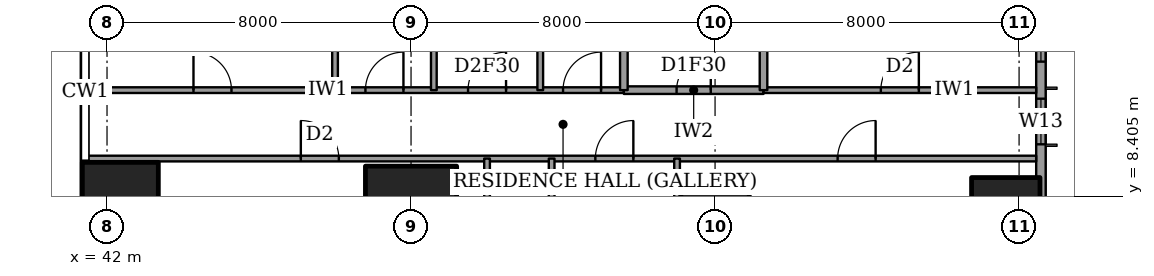
"""IFC4 building model, lengths in metres.
Left out: names, types, materials, properties, quantities, classifications, styles, units other than length and angle.
Written with IfcOpenShell. Run it as: python <this file> out.ifc"""

import sys

from ifc_helpers import new_model, si_unit, direction, frame, frame_2d, origin, origin_2d, place, context, subcontext, project, spatial, rectangle, extrude, element, fill, save


model = new_model("IFC4")
c1 = context("Model", 3, precision=1e-05, world=origin(), true_north=direction((0.0, 1.0)))
c2 = subcontext(c1, "Body", "Model", "MODEL_VIEW")
j1 = project(units=[si_unit("LENGTHUNIT", "METRE"), si_unit("PLANEANGLEUNIT", "RADIAN")], contexts=[c1])
p1 = place(None, origin())
s1 = spatial("IfcSite", under=j1, at=p1, CompositionType="ELEMENT")
p2 = place(p1, origin())
s2 = spatial("IfcBuilding", under=s1, at=p2, CompositionType="ELEMENT")
p3 = place(p2, frame((0.0, 0.0, 185.8)))
s3 = spatial("IfcBuildingStorey", under=s2, at=p3, CompositionType="ELEMENT", Elevation=185.8)
p4 = place(p3, frame((42.35, 8.0, 0.0), z_axis=(0.0, 0.0, 1.0), x_axis=(1.0, 0.0, 0.0)))
e1 = element("IfcColumn", 1, at=p4, inside=s3, PredefinedType="COLUMN", context=c2, shape_type="SweptSolid", body=[
    extrude(rectangle(XDim=2.0, YDim=2.6, at=origin_2d()), origin(), (0.0, 0.0, 1.0), 3.6),
])
p5 = place(p3, frame((50.0, 8.0, 0.0), z_axis=(0.0, 0.0, 1.0), x_axis=(1.0, 0.0, 0.0)))
e2 = element("IfcColumn", 2, at=p5, inside=s3, PredefinedType="COLUMN", context=c2, shape_type="SweptSolid", body=[
    extrude(rectangle(XDim=2.4, YDim=2.4, at=origin_2d()), origin(), (0.0, 0.0, 1.0), 3.6),
])
for number, where, z_axis, x_axis in (
    (3, (58.0, 8.0, 0.0), (0.0, 0.0, 1.0), (1.0, 0.0, 0.0)),
    (4, (65.65, 8.0, 0.0), (0.0, 0.0, 1.0), (1.0, 0.0, 0.0)),
):
    element("IfcColumn", number, at=place(p3, frame(where, z_axis=z_axis, x_axis=x_axis)), inside=s3, PredefinedType="COLUMN", context=c2, shape_type="SweptSolid", body=[
        extrude(rectangle(XDim=1.8, YDim=1.8, at=origin_2d()), origin(), (0.0, 0.0, 1.0), 3.6),
    ])
p6 = place(p3, frame((66.575, 3.175, 0.0), z_axis=(0.0, 0.0, 1.0), x_axis=(0.0, 1.0, 0.0)))
e5 = element("IfcWall", 5, at=p6, inside=s3, PredefinedType="SOLIDWALL", context=c2, shape_type="SweptSolid", body=[
    extrude(rectangle(XDim=41.65, YDim=0.25, at=frame_2d((20.825, 0.0))), origin(), (0.0, 0.0, 1.0), 3.6),
])
p7 = place(p6, frame((0.825, 0.0, 0.2)))
e6 = element("IfcOpeningElement", 6, at=p7, cuts=e5, PredefinedType="OPENING", context=c2, shape_type="SweptSolid", body=[
    extrude(rectangle(XDim=2.4, YDim=2.4, at=frame_2d((1.2, 1.2))), frame((0.0, 0.135, 0.0), z_axis=(0.0, -1.0, 0.0), x_axis=(1.0, 0.0, 0.0)), (0.0, 0.0, 1.0), 0.27),
])
p8 = place(p6, frame((6.6, 0.0, 0.2)))
e7 = element("IfcOpeningElement", 7, at=p8, cuts=e5, PredefinedType="OPENING", context=c2, shape_type="SweptSolid", body=[
    extrude(rectangle(XDim=1.2, YDim=2.4, at=frame_2d((0.6, 1.2))), frame((0.0, 0.135, 0.0), z_axis=(0.0, -1.0, 0.0), x_axis=(1.0, 0.0, 0.0)), (0.0, 0.0, 1.0), 0.27),
])
p9 = place(p6, frame((8.775, 0.0, 0.2)))
e8 = element("IfcOpeningElement", 8, at=p9, cuts=e5, PredefinedType="OPENING", context=c2, shape_type="SweptSolid", body=[
    extrude(rectangle(XDim=2.4, YDim=2.4, at=frame_2d((1.2, 1.2))), frame((0.0, 0.135, 0.0), z_axis=(0.0, -1.0, 0.0), x_axis=(1.0, 0.0, 0.0)), (0.0, 0.0, 1.0), 0.27),
])
p10 = place(p6, frame((15.675, 0.0, 0.2)))
e9 = element("IfcOpeningElement", 9, at=p10, cuts=e5, PredefinedType="OPENING", context=c2, shape_type="SweptSolid", body=[
    extrude(rectangle(XDim=2.4, YDim=2.4, at=frame_2d((1.2, 1.2))), frame((0.0, 0.135, 0.0), z_axis=(0.0, -1.0, 0.0), x_axis=(1.0, 0.0, 0.0)), (0.0, 0.0, 1.0), 0.27),
])
p11 = place(p6, frame((23.575, 0.0, 0.2)))
e10 = element("IfcOpeningElement", 10, at=p11, cuts=e5, PredefinedType="OPENING", context=c2, shape_type="SweptSolid", body=[
    extrude(rectangle(XDim=2.4, YDim=2.4, at=frame_2d((1.2, 1.2))), frame((0.0, 0.135, 0.0), z_axis=(0.0, -1.0, 0.0), x_axis=(1.0, 0.0, 0.0)), (0.0, 0.0, 1.0), 0.27),
])
p12 = place(p6, frame((30.775, 0.0, 0.2)))
e11 = element("IfcOpeningElement", 11, at=p12, cuts=e5, PredefinedType="OPENING", context=c2, shape_type="SweptSolid", body=[
    extrude(rectangle(XDim=2.4, YDim=2.4, at=frame_2d((1.2, 1.2))), frame((0.0, 0.135, 0.0), z_axis=(0.0, -1.0, 0.0), x_axis=(1.0, 0.0, 0.0)), (0.0, 0.0, 1.0), 0.27),
])
p13 = place(p6, frame((34.55, 0.0, 0.2)))
e12 = element("IfcOpeningElement", 12, at=p13, cuts=e5, PredefinedType="OPENING", context=c2, shape_type="SweptSolid", body=[
    extrude(rectangle(XDim=1.2, YDim=2.4, at=frame_2d((0.6, 1.2))), frame((0.0, 0.135, 0.0), z_axis=(0.0, -1.0, 0.0), x_axis=(1.0, 0.0, 0.0)), (0.0, 0.0, 1.0), 0.27),
])
p14 = place(p6, frame((38.425, 0.0, 0.2)))
e13 = element("IfcOpeningElement", 13, at=p14, cuts=e5, PredefinedType="OPENING", context=c2, shape_type="SweptSolid", body=[
    extrude(rectangle(XDim=2.4, YDim=2.4, at=frame_2d((1.2, 1.2))), frame((0.0, 0.135, 0.0), z_axis=(0.0, -1.0, 0.0), x_axis=(1.0, 0.0, 0.0)), (0.0, 0.0, 1.0), 0.27),
])
p15 = place(p3, frame((41.439, 9.4, 0.0), z_axis=(0.0, 0.0, 1.0), x_axis=(1.0, 0.0, 0.0)))
e14 = element("IfcWall", 14, at=p15, inside=s3, PredefinedType="PARTITIONING", context=c2, shape_type="SweptSolid", body=[
    extrude(rectangle(XDim=25.011, YDim=0.15, at=frame_2d((12.505, 0.0))), origin(), (0.0, 0.0, 1.0), 3.35),
])
p16 = place(p15, frame((19.786, 0.0, 0.0)))
e15 = element("IfcOpeningElement", 15, at=p16, cuts=e14, PredefinedType="OPENING", context=c2, shape_type="SweptSolid", body=[
    extrude(rectangle(XDim=1.0, YDim=2.1, at=frame_2d((0.5, 1.05))), frame((0.0, 0.085, 0.0), z_axis=(0.0, -1.0, 0.0), x_axis=(1.0, 0.0, 0.0)), (0.0, 0.0, 1.0), 0.17),
])
p17 = place(p15, frame((13.411, 0.0, 0.0)))
e16 = element("IfcOpeningElement", 16, at=p17, cuts=e14, PredefinedType="OPENING", context=c2, shape_type="SweptSolid", body=[
    extrude(rectangle(XDim=1.0, YDim=2.1, at=frame_2d((0.5, 1.05))), frame((0.0, 0.085, 0.0), z_axis=(0.0, -1.0, 0.0), x_axis=(1.0, 0.0, 0.0)), (0.0, 0.0, 1.0), 0.17),
])
p18 = place(p15, frame((5.661, 0.0, 0.0)))
e17 = element("IfcOpeningElement", 17, at=p18, cuts=e14, PredefinedType="OPENING", context=c2, shape_type="SweptSolid", body=[
    extrude(rectangle(XDim=1.0, YDim=2.1, at=frame_2d((0.5, 1.05))), frame((0.0, 0.085, 0.0), z_axis=(0.0, -1.0, 0.0), x_axis=(1.0, 0.0, 0.0)), (0.0, 0.0, 1.0), 0.17),
])
p19 = place(p3, frame((55.6, 11.2, 0.0), z_axis=(0.0, 0.0, 1.0), x_axis=(1.0, 0.0, 0.0)))
e18 = element("IfcWall", 18, at=p19, inside=s3, PredefinedType="PARTITIONING", context=c2, shape_type="SweptSolid", body=[
    extrude(rectangle(XDim=3.675, YDim=0.2, at=frame_2d((1.837, 0.0))), origin(), (0.0, 0.0, 1.0), 3.35),
])
p20 = place(p19, frame((1.387, 0.0, 0.0)))
e19 = element("IfcOpeningElement", 19, at=p20, cuts=e18, PredefinedType="OPENING", context=c2, shape_type="SweptSolid", body=[
    extrude(rectangle(XDim=0.9, YDim=2.1, at=frame_2d((0.45, 1.05))), frame((0.0, 0.11, 0.0), z_axis=(0.0, -1.0, 0.0), x_axis=(1.0, 0.0, 0.0)), (0.0, 0.0, 1.0), 0.22),
])
p21 = place(p3, frame((41.439, 11.2, 0.0), z_axis=(0.0, 0.0, 1.0), x_axis=(1.0, 0.0, 0.0)))
e20 = element("IfcWall", 20, at=p21, inside=s3, PredefinedType="PARTITIONING", context=c2, shape_type="SweptSolid", body=[
    extrude(rectangle(XDim=14.161, YDim=0.15, at=frame_2d((7.081, 0.0))), origin(), (0.0, 0.0, 1.0), 3.35),
])
p22 = place(p21, frame((12.561, 0.0, 0.0)))
e21 = element("IfcOpeningElement", 21, at=p22, cuts=e20, PredefinedType="OPENING", context=c2, shape_type="SweptSolid", body=[
    extrude(rectangle(XDim=1.0, YDim=2.1, at=frame_2d((0.5, 1.05))), frame((0.0, 0.085, 0.0), z_axis=(0.0, -1.0, 0.0), x_axis=(1.0, 0.0, 0.0)), (0.0, 0.0, 1.0), 0.17),
])
p23 = place(p21, frame((10.061, 0.0, 0.0)))
e22 = element("IfcOpeningElement", 22, at=p23, cuts=e20, PredefinedType="OPENING", context=c2, shape_type="SweptSolid", body=[
    extrude(rectangle(XDim=1.0, YDim=2.1, at=frame_2d((0.5, 1.05))), frame((0.0, 0.085, 0.0), z_axis=(0.0, -1.0, 0.0), x_axis=(1.0, 0.0, 0.0)), (0.0, 0.0, 1.0), 0.17),
])
p24 = place(p21, frame((7.361, 0.0, 0.0)))
e23 = element("IfcOpeningElement", 23, at=p24, cuts=e20, PredefinedType="OPENING", context=c2, shape_type="SweptSolid", body=[
    extrude(rectangle(XDim=1.0, YDim=2.1, at=frame_2d((0.5, 1.05))), frame((0.0, 0.085, 0.0), z_axis=(0.0, -1.0, 0.0), x_axis=(1.0, 0.0, 0.0)), (0.0, 0.0, 1.0), 0.17),
])
p25 = place(p21, frame((2.836, 0.0, 0.0)))
e24 = element("IfcOpeningElement", 24, at=p25, cuts=e20, PredefinedType="OPENING", context=c2, shape_type="SweptSolid", body=[
    extrude(rectangle(XDim=1.0, YDim=2.1, at=frame_2d((0.5, 1.05))), frame((0.0, 0.085, 0.0), z_axis=(0.0, -1.0, 0.0), x_axis=(1.0, 0.0, 0.0)), (0.0, 0.0, 1.0), 0.17),
])
p26 = place(p3, frame((59.275, 11.2, 0.0), z_axis=(0.0, 0.0, 1.0), x_axis=(1.0, 0.0, 0.0)))
e25 = element("IfcWall", 25, at=p26, inside=s3, PredefinedType="PARTITIONING", context=c2, shape_type="SweptSolid", body=[
    extrude(rectangle(XDim=7.175, YDim=0.15, at=frame_2d((3.587, 0.0))), origin(), (0.0, 0.0, 1.0), 3.35),
])
p27 = place(p26, frame((3.087, 0.0, 0.0)))
e26 = element("IfcOpeningElement", 26, at=p27, cuts=e25, PredefinedType="OPENING", context=c2, shape_type="SweptSolid", body=[
    extrude(rectangle(XDim=1.0, YDim=2.1, at=frame_2d((0.5, 1.05))), frame((0.0, 0.085, 0.0), z_axis=(0.0, -1.0, 0.0), x_axis=(1.0, 0.0, 0.0)), (0.0, 0.0, 1.0), 0.17),
])
p28 = place(p3, frame((48.0, 11.2, 0.0), z_axis=(0.0, 0.0, 1.0), x_axis=(0.0, 1.0, 0.0)))
e27 = element("IfcWall", 27, at=p28, inside=s3, PredefinedType="PARTITIONING", context=c2, shape_type="SweptSolid", body=[
    extrude(rectangle(XDim=6.8, YDim=0.15, at=frame_2d((3.4, 0.0))), origin(), (0.0, 0.0, 1.0), 3.35),
])
p29 = place(p3, frame((50.6, 11.2, 0.0), z_axis=(0.0, 0.0, 1.0), x_axis=(0.0, 1.0, 0.0)))
e28 = element("IfcWall", 28, at=p29, inside=s3, PredefinedType="PARTITIONING", context=c2, shape_type="SweptSolid", body=[
    extrude(rectangle(XDim=3.6, YDim=0.15, at=frame_2d((1.8, 0.0))), origin(), (0.0, 0.0, 1.0), 3.35),
])
p30 = place(p3, frame((52.0, -0.45, 0.0), z_axis=(0.0, 0.0, 1.0), x_axis=(0.0, 1.0, 0.0)))
e29 = element("IfcWall", 29, at=p30, inside=s3, PredefinedType="PARTITIONING", context=c2, shape_type="SweptSolid", body=[
    extrude(rectangle(XDim=9.85, YDim=0.15, at=frame_2d((4.925, 0.0))), origin(), (0.0, 0.0, 1.0), 3.35),
])
p31 = place(p3, frame((53.4, 11.2, 0.0), z_axis=(0.0, 0.0, 1.0), x_axis=(0.0, 1.0, 0.0)))
e30 = element("IfcWall", 30, at=p31, inside=s3, PredefinedType="PARTITIONING", context=c2, shape_type="SweptSolid", body=[
    extrude(rectangle(XDim=6.8, YDim=0.15, at=frame_2d((3.4, 0.0))), origin(), (0.0, 0.0, 1.0), 3.35),
])
p32 = place(p3, frame((53.7, -0.45, 0.0), z_axis=(0.0, 0.0, 1.0), x_axis=(0.0, 1.0, 0.0)))
e31 = element("IfcWall", 31, at=p32, inside=s3, PredefinedType="PARTITIONING", context=c2, shape_type="SweptSolid", body=[
    extrude(rectangle(XDim=9.85, YDim=0.15, at=frame_2d((4.925, 0.0))), origin(), (0.0, 0.0, 1.0), 3.35),
])
p33 = place(p32, frame((4.475, 0.0, 0.0)))
e32 = element("IfcOpeningElement", 32, at=p33, cuts=e31, PredefinedType="OPENING", context=c2, shape_type="SweptSolid", body=[
    extrude(rectangle(XDim=0.9, YDim=2.1, at=frame_2d((0.45, 1.05))), frame((0.0, 0.085, 0.0), z_axis=(0.0, -1.0, 0.0), x_axis=(1.0, 0.0, 0.0)), (0.0, 0.0, 1.0), 0.17),
])
p34 = place(p3, frame((55.6, 11.2, 0.0), z_axis=(0.0, 0.0, 1.0), x_axis=(0.0, 1.0, 0.0)))
e33 = element("IfcWall", 33, at=p34, inside=s3, PredefinedType="PARTITIONING", context=c2, shape_type="SweptSolid", body=[
    extrude(rectangle(XDim=3.4, YDim=0.2, at=frame_2d((1.7, 0.0))), origin(), (0.0, 0.0, 1.0), 3.35),
])
p35 = place(p3, frame((57.0, -0.45, 0.0), z_axis=(0.0, 0.0, 1.0), x_axis=(0.0, 1.0, 0.0)))
e34 = element("IfcWall", 34, at=p35, inside=s3, PredefinedType="PARTITIONING", context=c2, shape_type="SweptSolid", body=[
    extrude(rectangle(XDim=9.85, YDim=0.15, at=frame_2d((4.925, 0.0))), origin(), (0.0, 0.0, 1.0), 3.35),
])
p36 = place(p3, frame((59.275, 11.2, 0.0), z_axis=(0.0, 0.0, 1.0), x_axis=(0.0, 1.0, 0.0)))
e35 = element("IfcWall", 35, at=p36, inside=s3, PredefinedType="PARTITIONING", context=c2, shape_type="SweptSolid", body=[
    extrude(rectangle(XDim=3.4, YDim=0.2, at=frame_2d((1.7, 0.0))), origin(), (0.0, 0.0, 1.0), 3.35),
])
p37 = place(p8, origin())
e36 = element("IfcWindow", 36, at=p37, inside=s3, PartitioningType="SINGLE_PANEL", PredefinedType="WINDOW", context=c2, shape_type="SweptSolid", body=[
    extrude(rectangle(XDim=1.2, YDim=2.4, at=frame_2d((0.6, 1.2))), frame((0.0, 0.03, 0.0), z_axis=(0.0, -1.0, 0.0), x_axis=(1.0, 0.0, 0.0)), (0.0, 0.0, 1.0), 0.06),
])
fill(e7, e36)
p38 = place(p9, origin())
e37 = element("IfcWindow", 37, at=p38, inside=s3, PartitioningType="SINGLE_PANEL", PredefinedType="WINDOW", context=c2, shape_type="SweptSolid", body=[
    extrude(rectangle(XDim=2.4, YDim=2.4, at=frame_2d((1.2, 1.2))), frame((0.0, 0.03, 0.0), z_axis=(0.0, -1.0, 0.0), x_axis=(1.0, 0.0, 0.0)), (0.0, 0.0, 1.0), 0.06),
])
fill(e8, e37)
p39 = place(p16, origin())
e38 = element("IfcDoor", 38, at=p39, inside=s3, OperationType="SINGLE_SWING_LEFT", PredefinedType="DOOR", context=c2, shape_type="SweptSolid", body=[
    extrude(rectangle(XDim=1.0, YDim=2.1, at=frame_2d((0.5, 1.05))), frame((0.0, 0.025, 0.0), z_axis=(0.0, -1.0, 0.0), x_axis=(1.0, 0.0, 0.0)), (0.0, 0.0, 1.0), 0.05),
])
fill(e15, e38)
p40 = place(p17, origin())
e39 = element("IfcDoor", 39, at=p40, inside=s3, OperationType="SINGLE_SWING_LEFT", PredefinedType="DOOR", context=c2, shape_type="SweptSolid", body=[
    extrude(rectangle(XDim=1.0, YDim=2.1, at=frame_2d((0.5, 1.05))), frame((0.0, 0.025, 0.0), z_axis=(0.0, -1.0, 0.0), x_axis=(1.0, 0.0, 0.0)), (0.0, 0.0, 1.0), 0.05),
])
fill(e16, e39)
p41 = place(p18, origin())
e40 = element("IfcDoor", 40, at=p41, inside=s3, OperationType="SINGLE_SWING_RIGHT", PredefinedType="DOOR", context=c2, shape_type="SweptSolid", body=[
    extrude(rectangle(XDim=1.0, YDim=2.1, at=frame_2d((0.5, 1.05))), frame((0.0, 0.025, 0.0), z_axis=(0.0, -1.0, 0.0), x_axis=(1.0, 0.0, 0.0)), (0.0, 0.0, 1.0), 0.05),
])
fill(e17, e40)
p42 = place(p22, origin())
e41 = element("IfcDoor", 41, at=p42, inside=s3, OperationType="SINGLE_SWING_LEFT", PredefinedType="DOOR", context=c2, shape_type="SweptSolid", body=[
    extrude(rectangle(XDim=1.0, YDim=2.1, at=frame_2d((0.5, 1.05))), frame((0.0, 0.025, 0.0), z_axis=(0.0, -1.0, 0.0), x_axis=(1.0, 0.0, 0.0)), (0.0, 0.0, 1.0), 0.05),
])
fill(e21, e41)
p43 = place(p27, origin())
e42 = element("IfcDoor", 42, at=p43, inside=s3, OperationType="SINGLE_SWING_LEFT", PredefinedType="DOOR", context=c2, shape_type="SweptSolid", body=[
    extrude(rectangle(XDim=1.0, YDim=2.1, at=frame_2d((0.5, 1.05))), frame((0.0, 0.025, 0.0), z_axis=(0.0, -1.0, 0.0), x_axis=(1.0, 0.0, 0.0)), (0.0, 0.0, 1.0), 0.05),
])
fill(e26, e42)
p44 = place(p20, origin())
e43 = element("IfcDoor", 43, at=p44, inside=s3, OperationType="SINGLE_SWING_LEFT", PredefinedType="DOOR", context=c2, shape_type="SweptSolid", body=[
    extrude(rectangle(XDim=0.9, YDim=2.1, at=frame_2d((0.45, 1.05))), frame((0.0, 0.025, 0.0), z_axis=(0.0, -1.0, 0.0), x_axis=(1.0, 0.0, 0.0)), (0.0, 0.0, 1.0), 0.05),
])
fill(e19, e43)
p45 = place(p23, origin())
e44 = element("IfcDoor", 44, at=p45, inside=s3, OperationType="SINGLE_SWING_LEFT", PredefinedType="DOOR", context=c2, shape_type="SweptSolid", body=[
    extrude(rectangle(XDim=1.0, YDim=2.1, at=frame_2d((0.5, 1.05))), frame((0.0, 0.025, 0.0), z_axis=(0.0, -1.0, 0.0), x_axis=(1.0, 0.0, 0.0)), (0.0, 0.0, 1.0), 0.05),
])
fill(e22, e44)
p46 = place(p24, origin())
e45 = element("IfcDoor", 45, at=p46, inside=s3, OperationType="SINGLE_SWING_LEFT", PredefinedType="DOOR", context=c2, shape_type="SweptSolid", body=[
    extrude(rectangle(XDim=1.0, YDim=2.1, at=frame_2d((0.5, 1.05))), frame((0.0, 0.025, 0.0), z_axis=(0.0, -1.0, 0.0), x_axis=(1.0, 0.0, 0.0)), (0.0, 0.0, 1.0), 0.05),
])
fill(e23, e45)
p47 = place(p25, origin())
e46 = element("IfcDoor", 46, at=p47, inside=s3, OperationType="SINGLE_SWING_RIGHT", PredefinedType="DOOR", context=c2, shape_type="SweptSolid", body=[
    extrude(rectangle(XDim=1.0, YDim=2.1, at=frame_2d((0.5, 1.05))), frame((0.0, 0.025, 0.0), z_axis=(0.0, -1.0, 0.0), x_axis=(1.0, 0.0, 0.0)), (0.0, 0.0, 1.0), 0.05),
])
fill(e24, e46)
save(model, sys.argv[1])
